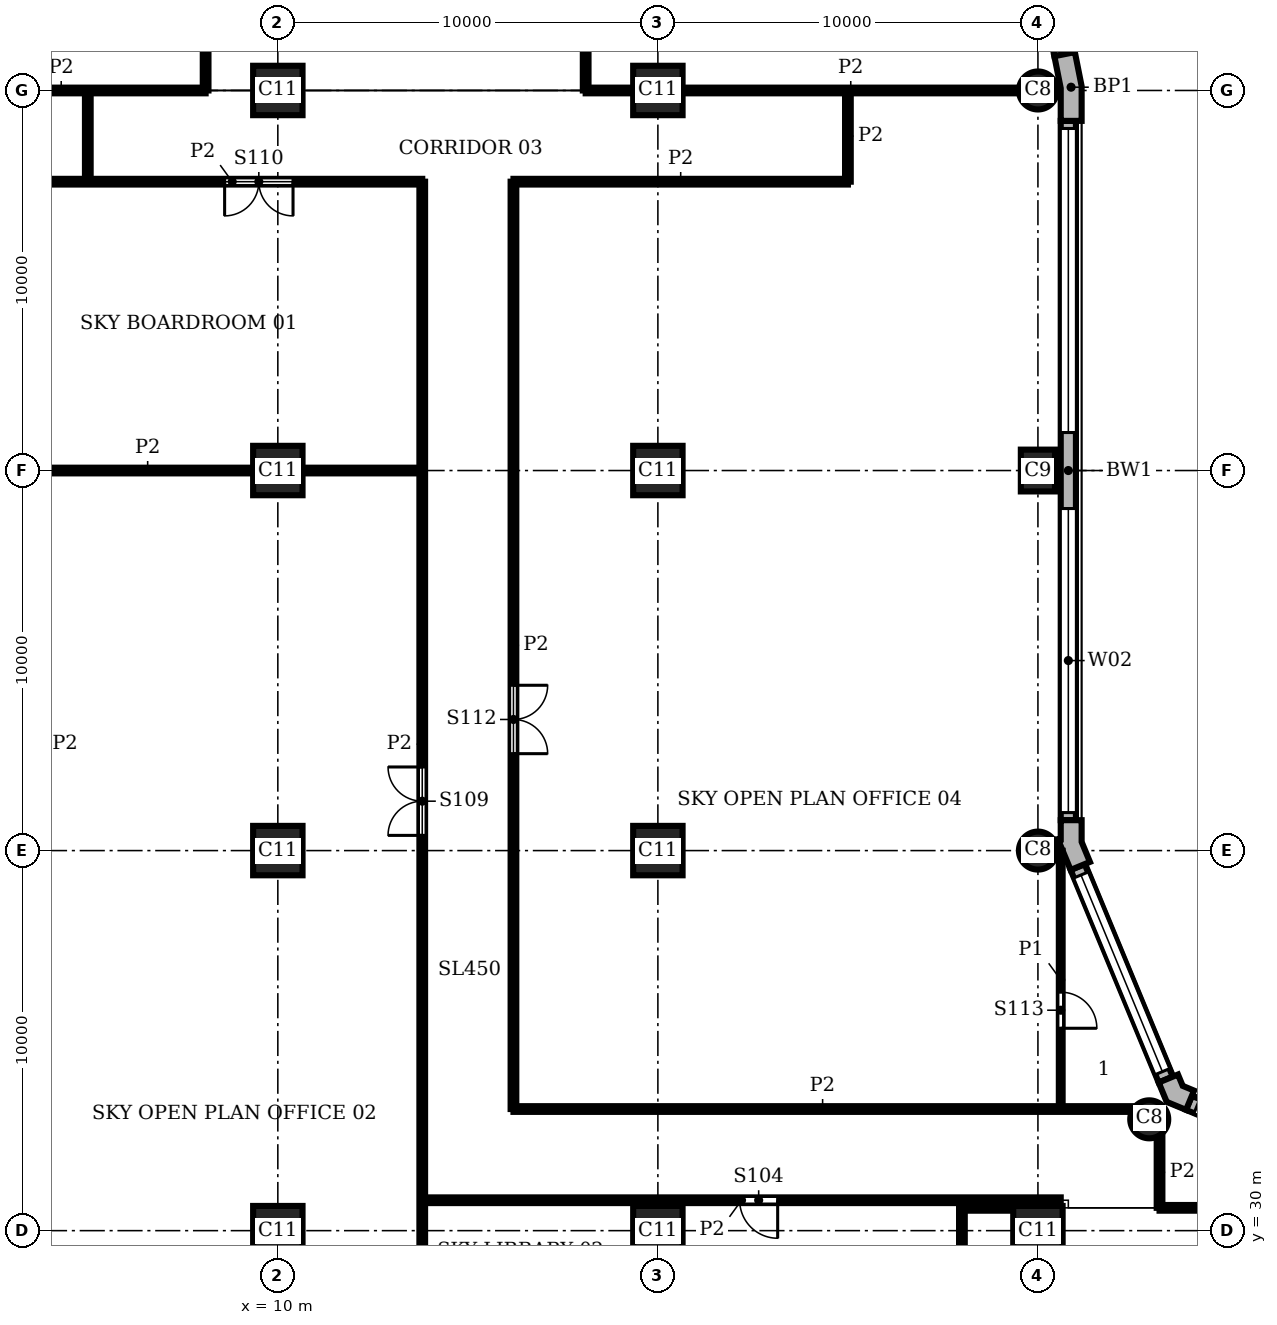
"""IFC4 building model, lengths in metres.
Left out: names, types, materials, properties, quantities, classifications, styles, units other than length and angle.
Written with IfcOpenShell. Run it as: python <this file> out.ifc"""

import sys

from ifc_helpers import new_model, si_unit, direction, frame, frame_2d, origin, origin_2d, place, context, subcontext, project, spatial, polyline, rectangle, circle, outline, extrude, element, fill, save


model = new_model("IFC4")
c1 = context("Model", 3, precision=1e-05, world=origin(), true_north=direction((0.0, 1.0)))
c2 = subcontext(c1, "Body", "Model", "MODEL_VIEW")
j1 = project(units=[si_unit("LENGTHUNIT", "METRE"), si_unit("PLANEANGLEUNIT", "RADIAN")], contexts=[c1])
p1 = place(None, origin())
s1 = spatial("IfcSite", under=j1, at=p1, CompositionType="ELEMENT")
p2 = place(p1, origin())
s2 = spatial("IfcBuilding", under=s1, at=p2, CompositionType="ELEMENT")
p3 = place(p2, frame((0.0, 0.0, 126.3)))
s3 = spatial("IfcBuildingStorey", under=s2, at=p3, CompositionType="ELEMENT", Elevation=126.3)
for number, where, z_axis, x_axis in (
    (1, (32.929, 32.929, 0.0), (0.0, 0.0, 1.0), (1.0, 0.0, 0.0)),
    (2, (30.0, 40.0, 0.0), (0.0, 0.0, 1.0), (1.0, 0.0, 0.0)),
):
    element("IfcColumn", number, at=place(p3, frame(where, z_axis=z_axis, x_axis=x_axis)), inside=s3, PredefinedType="COLUMN", context=c2, shape_type="SweptSolid", body=[
        extrude(circle(Radius=0.5, at=origin_2d()), origin(), (0.0, 0.0, 1.0), 5.4),
    ])
p4 = place(p3, frame((30.0, 50.0, 0.0), z_axis=(0.0, 0.0, 1.0), x_axis=(0.0, 1.0, 0.0)))
e3 = element("IfcColumn", 3, at=p4, inside=s3, PredefinedType="COLUMN", context=c2, shape_type="SweptSolid", body=[
    extrude(rectangle(XDim=1.1, YDim=0.9, at=origin_2d()), origin(), (0.0, 0.0, 1.0), 5.4),
])
p5 = place(p3, frame((30.0, 60.0, 0.0), z_axis=(0.0, 0.0, 1.0), x_axis=(1.0, 0.0, 0.0)))
e4 = element("IfcColumn", 4, at=p5, inside=s3, PredefinedType="COLUMN", context=c2, shape_type="SweptSolid", body=[
    extrude(circle(Radius=0.5, at=origin_2d()), origin(), (0.0, 0.0, 1.0), 5.4),
])
for number, where, z_axis, x_axis in (
    (5, (10.0, 30.0, 0.0), (0.0, 0.0, 1.0), (1.0, 0.0, 0.0)),
    (6, (10.0, 40.0, 0.0), (0.0, 0.0, 1.0), (1.0, 0.0, 0.0)),
    (7, (10.0, 50.0, 0.0), (0.0, 0.0, 1.0), (1.0, 0.0, 0.0)),
    (8, (10.0, 60.0, 0.0), (0.0, 0.0, 1.0), (1.0, 0.0, 0.0)),
    (9, (20.0, 30.0, 0.0), (0.0, 0.0, 1.0), (1.0, 0.0, 0.0)),
    (10, (20.0, 40.0, 0.0), (0.0, 0.0, 1.0), (1.0, 0.0, 0.0)),
    (11, (20.0, 50.0, 0.0), (0.0, 0.0, 1.0), (1.0, 0.0, 0.0)),
    (12, (20.0, 60.0, 0.0), (0.0, 0.0, 1.0), (1.0, 0.0, 0.0)),
    (13, (30.0, 30.0, 0.0), (0.0, 0.0, 1.0), (1.0, 0.0, 0.0)),
):
    element("IfcColumn", number, at=place(p3, frame(where, z_axis=z_axis, x_axis=x_axis)), inside=s3, PredefinedType="COLUMN", context=c2, shape_type="SweptSolid", body=[
        extrude(rectangle(XDim=1.3, YDim=1.3, at=origin_2d()), origin(), (0.0, 0.0, 1.0), 5.4),
    ])
p6 = place(p3, origin())
e14 = element("IfcWall", 14, at=p6, inside=s3, PredefinedType="SOLIDWALL", context=c2, shape_type="SweptSolid", body=[
    extrude(outline(polyline([(34.051, 33.547), (34.108, 33.685), (33.809, 33.809), (33.685, 34.108), (33.547, 34.051), (33.177, 33.898), (33.388, 33.388), (33.898, 33.177), (34.051, 33.547)])), origin(), (0.0, 0.0, 1.0), 5.4),
])
e15 = element("IfcWall", 15, at=p6, inside=s3, PredefinedType="SOLIDWALL", context=c2, shape_type="SweptSolid", body=[
    extrude(outline(polyline([(30.62, 39.995), (30.62, 40.071), (30.861, 39.49), (31.23, 39.644), (31.369, 39.701), (31.15, 40.229), (31.15, 40.8), (31.0, 40.8), (30.6, 40.8), (30.6, 40.295), (30.5, 40.295), (30.5, 39.995), (30.62, 39.995)])), origin(), (0.0, 0.0, 1.0), 5.4),
])
e16 = element("IfcWall", 16, at=p6, inside=s3, PredefinedType="SOLIDWALL", context=c2, shape_type="SweptSolid", body=[
    extrude(outline(polyline([(31.0, 59.2), (31.15, 59.2), (31.15, 60.113), (30.972, 61.009), (30.825, 60.98), (30.432, 60.902), (30.6, 60.059), (30.6, 59.2), (31.0, 59.2)])), origin(), (0.0, 0.0, 1.0), 5.4),
])
p7 = place(p3, frame((39.567, 31.045, 0.0), z_axis=(0.0, 0.0, 1.0), x_axis=(-0.923891000409, 0.382655745237, 0.0)))
e17 = element("IfcWall", 17, at=p7, inside=s3, PredefinedType="SOLIDWALL", context=c2, shape_type="SweptSolid", body=[
    extrude(rectangle(XDim=6.053, YDim=0.4, at=frame_2d((3.027, 0.0))), origin(), (0.0, 0.0, 1.0), 5.4),
])
p8 = place(p7, frame((0.227, 0.0, 0.9)))
e18 = element("IfcOpeningElement", 18, at=p8, cuts=e17, PredefinedType="OPENING", context=c2, shape_type="SweptSolid", body=[
    extrude(rectangle(XDim=5.6, YDim=3.4, at=frame_2d((2.8, 1.7))), frame((0.0, 0.21, 0.0), z_axis=(0.0, -1.0, 0.0), x_axis=(1.0, 0.0, 0.0)), (0.0, 0.0, 1.0), 0.42),
])
p9 = place(p3, frame((33.362, 33.974, 0.0), z_axis=(0.0, 0.0, 1.0), x_axis=(-0.382655745237, 0.923891000409, 0.0)))
e19 = element("IfcWall", 19, at=p9, inside=s3, PredefinedType="SOLIDWALL", context=c2, shape_type="SweptSolid", body=[
    extrude(rectangle(XDim=6.053, YDim=0.4, at=frame_2d((3.027, 0.0))), origin(), (0.0, 0.0, 1.0), 5.4),
])
p10 = place(p9, frame((0.227, 0.0, 0.9)))
e20 = element("IfcOpeningElement", 20, at=p10, cuts=e19, PredefinedType="OPENING", context=c2, shape_type="SweptSolid", body=[
    extrude(rectangle(XDim=5.6, YDim=3.4, at=frame_2d((2.8, 1.7))), frame((0.0, 0.21, 0.0), z_axis=(0.0, -1.0, 0.0), x_axis=(1.0, 0.0, 0.0)), (0.0, 0.0, 1.0), 0.42),
])
p11 = place(p3, frame((30.8, 40.8, 0.0), z_axis=(0.0, 0.0, 1.0), x_axis=(0.0, 1.0, 0.0)))
e21 = element("IfcWall", 21, at=p11, inside=s3, PredefinedType="SOLIDWALL", context=c2, shape_type="SweptSolid", body=[
    extrude(rectangle(XDim=18.4, YDim=0.4, at=frame_2d((9.2, 0.0))), origin(), (0.0, 0.0, 1.0), 5.4),
])
p12 = place(p11, frame((0.2, 0.0, 0.9)))
e22 = element("IfcOpeningElement", 22, at=p12, cuts=e21, PredefinedType="OPENING", context=c2, shape_type="SweptSolid", body=[
    extrude(rectangle(XDim=8.0, YDim=3.4, at=frame_2d((4.0, 1.7))), frame((0.0, 0.21, 0.0), z_axis=(0.0, -1.0, 0.0), x_axis=(1.0, 0.0, 0.0)), (0.0, 0.0, 1.0), 0.42),
])
p13 = place(p11, frame((10.2, 0.0, 0.9)))
e23 = element("IfcOpeningElement", 23, at=p13, cuts=e21, PredefinedType="OPENING", context=c2, shape_type="SweptSolid", body=[
    extrude(rectangle(XDim=8.0, YDim=3.4, at=frame_2d((4.0, 1.7))), frame((0.0, 0.21, 0.0), z_axis=(0.0, -1.0, 0.0), x_axis=(1.0, 0.0, 0.0)), (0.0, 0.0, 1.0), 0.42),
])
p14 = place(p3, frame((30.629, 60.941, 0.0), z_axis=(0.0, 0.0, 1.0), x_axis=(-0.195098533057, 0.98078364709, 0.0)))
e24 = element("IfcWall", 24, at=p14, inside=s3, PredefinedType="SOLIDWALL", context=c2, shape_type="SweptSolid", body=[
    extrude(rectangle(XDim=4.753, YDim=0.4, at=frame_2d((2.376, 0.0))), origin(), (0.0, 0.0, 1.0), 5.4),
])
p15 = place(p14, frame((0.226, 0.0, 0.9)))
e25 = element("IfcOpeningElement", 25, at=p15, cuts=e24, PredefinedType="OPENING", context=c2, shape_type="SweptSolid", body=[
    extrude(rectangle(XDim=4.3, YDim=3.4, at=frame_2d((2.15, 1.7))), frame((0.0, 0.21, 0.0), z_axis=(0.0, -1.0, 0.0), x_axis=(1.0, 0.0, 0.0)), (0.0, 0.0, 1.0), 0.42),
])
p16 = place(p3, frame((30.6, 33.2, 0.0), z_axis=(0.0, 0.0, 1.0), x_axis=(0.0, 1.0, 0.0)))
e26 = element("IfcWall", 26, at=p16, inside=s3, PredefinedType="PARTITIONING", context=c2, shape_type="SweptSolid", body=[
    extrude(rectangle(XDim=6.795, YDim=0.1, at=frame_2d((3.397, 0.0))), origin(), (0.0, 0.0, 1.0), 5.08),
])
p17 = place(p16, frame((2.125, 0.0, 0.0)))
e27 = element("IfcOpeningElement", 27, at=p17, cuts=e26, PredefinedType="OPENING", context=c2, shape_type="SweptSolid", body=[
    extrude(rectangle(XDim=0.95, YDim=2.1, at=frame_2d((0.475, 1.05))), frame((0.0, 0.06, 0.0), z_axis=(0.0, -1.0, 0.0), x_axis=(1.0, 0.0, 0.0)), (0.0, 0.0, 1.0), 0.12),
])
p18 = place(p3, frame((5.0, 57.6, 0.0), z_axis=(0.0, 0.0, 1.0), x_axis=(0.0, 1.0, 0.0)))
e28 = element("IfcWall", 28, at=p18, inside=s3, PredefinedType="PARTITIONING", context=c2, shape_type="SweptSolid", body=[
    extrude(rectangle(XDim=2.4, YDim=0.15, at=frame_2d((1.2, 0.0))), origin(), (0.0, 0.0, 1.0), 5.08),
])
p19 = place(p3, frame((8.1, 60.0, 0.0), z_axis=(0.0, 0.0, 1.0), x_axis=(0.0, 1.0, 0.0)))
e29 = element("IfcWall", 29, at=p19, inside=s3, PredefinedType="PARTITIONING", context=c2, shape_type="SweptSolid", body=[
    extrude(rectangle(XDim=6.4, YDim=0.15, at=frame_2d((3.2, 0.0))), origin(), (0.0, 0.0, 1.0), 5.08),
])
p20 = place(p19, frame((2.6, 0.0, 0.0)))
e30 = element("IfcOpeningElement", 30, at=p20, cuts=e29, PredefinedType="OPENING", context=c2, shape_type="SweptSolid", body=[
    extrude(rectangle(XDim=1.8, YDim=2.1, at=frame_2d((0.9, 1.05))), frame((0.0, 0.085, 0.0), z_axis=(0.0, -1.0, 0.0), x_axis=(1.0, 0.0, 0.0)), (0.0, 0.0, 1.0), 0.17),
])
p21 = place(p3, frame((13.8, 28.0, 0.0), z_axis=(0.0, 0.0, 1.0), x_axis=(0.0, 1.0, 0.0)))
e31 = element("IfcWall", 31, at=p21, inside=s3, PredefinedType="PARTITIONING", context=c2, shape_type="SweptSolid", body=[
    extrude(rectangle(XDim=29.6, YDim=0.15, at=frame_2d((14.8, 0.0))), origin(), (0.0, 0.0, 1.0), 5.08),
])
p22 = place(p21, frame((12.4, 0.0, 0.0)))
e32 = element("IfcOpeningElement", 32, at=p22, cuts=e31, PredefinedType="OPENING", context=c2, shape_type="SweptSolid", body=[
    extrude(rectangle(XDim=1.8, YDim=2.1, at=frame_2d((0.9, 1.05))), frame((0.0, 0.085, 0.0), z_axis=(0.0, -1.0, 0.0), x_axis=(1.0, 0.0, 0.0)), (0.0, 0.0, 1.0), 0.17),
])
p23 = place(p3, frame((16.2, 33.2, 0.0), z_axis=(0.0, 0.0, 1.0), x_axis=(0.0, 1.0, 0.0)))
e33 = element("IfcWall", 33, at=p23, inside=s3, PredefinedType="PARTITIONING", context=c2, shape_type="SweptSolid", body=[
    extrude(rectangle(XDim=24.4, YDim=0.15, at=frame_2d((12.2, 0.0))), origin(), (0.0, 0.0, 1.0), 5.08),
])
p24 = place(p23, frame((9.35, 0.0, 0.0)))
e34 = element("IfcOpeningElement", 34, at=p24, cuts=e33, PredefinedType="OPENING", context=c2, shape_type="SweptSolid", body=[
    extrude(rectangle(XDim=1.8, YDim=2.1, at=frame_2d((0.9, 1.05))), frame((0.0, 0.085, 0.0), z_axis=(0.0, -1.0, 0.0), x_axis=(1.0, 0.0, 0.0)), (0.0, 0.0, 1.0), 0.17),
])
p25 = place(p3, frame((18.1, 60.0, 0.0), z_axis=(0.0, 0.0, 1.0), x_axis=(0.0, 1.0, 0.0)))
e35 = element("IfcWall", 35, at=p25, inside=s3, PredefinedType="PARTITIONING", context=c2, shape_type="SweptSolid", body=[
    extrude(rectangle(XDim=6.4, YDim=0.15, at=frame_2d((3.2, 0.0))), origin(), (0.0, 0.0, 1.0), 5.08),
])
p26 = place(p3, frame((25.0, 57.6, 0.0), z_axis=(0.0, 0.0, 1.0), x_axis=(0.0, 1.0, 0.0)))
e36 = element("IfcWall", 36, at=p26, inside=s3, PredefinedType="PARTITIONING", context=c2, shape_type="SweptSolid", body=[
    extrude(rectangle(XDim=2.4, YDim=0.15, at=frame_2d((1.2, 0.0))), origin(), (0.0, 0.0, 1.0), 5.08),
])
p27 = place(p3, frame((28.0, 28.0, 0.0), z_axis=(0.0, 0.0, 1.0), x_axis=(0.0, 1.0, 0.0)))
e37 = element("IfcWall", 37, at=p27, inside=s3, PredefinedType="PARTITIONING", context=c2, shape_type="SweptSolid", body=[
    extrude(rectangle(XDim=2.598, YDim=0.15, at=frame_2d((1.299, 0.0))), origin(), (0.0, 0.0, 1.0), 5.08),
])
p28 = place(p3, frame((33.2, 30.6, 0.0), z_axis=(0.0, 0.0, 1.0), x_axis=(0.0, 1.0, 0.0)))
e38 = element("IfcWall", 38, at=p28, inside=s3, PredefinedType="PARTITIONING", context=c2, shape_type="SweptSolid", body=[
    extrude(rectangle(XDim=1.869, YDim=0.15, at=frame_2d((0.935, 0.0))), origin(), (0.0, 0.0, 1.0), 5.08),
])
p29 = place(p3, frame((28.002, 30.6, 0.0), z_axis=(0.0, 0.0, 1.0), x_axis=(1.0, 0.0, 0.0)))
e39 = element("IfcWall", 39, at=p29, inside=s3, PredefinedType="PARTITIONING", context=c2, shape_type="SweptSolid", body=[
    extrude(rectangle(XDim=1.348, YDim=0.15, at=frame_2d((0.674, 0.0))), origin(), (0.0, 0.0, 1.0), 5.08),
])
p30 = place(p3, frame((33.2, 30.6, 0.0), z_axis=(0.0, 0.0, 1.0), x_axis=(1.0, 0.0, 0.0)))
e40 = element("IfcWall", 40, at=p30, inside=s3, PredefinedType="PARTITIONING", context=c2, shape_type="SweptSolid", body=[
    extrude(rectangle(XDim=6.738, YDim=0.15, at=frame_2d((3.369, 0.0))), origin(), (0.0, 0.0, 1.0), 5.08),
])
p31 = place(p3, frame((13.802, 30.8, 0.0), z_axis=(0.0, 0.0, 1.0), x_axis=(1.0, 0.0, 0.0)))
e41 = element("IfcWall", 41, at=p31, inside=s3, PredefinedType="PARTITIONING", context=c2, shape_type="SweptSolid", body=[
    extrude(rectangle(XDim=16.798, YDim=0.15, at=frame_2d((8.399, 0.0))), origin(), (0.0, 0.0, 1.0), 5.08),
])
p32 = place(p31, frame((8.35, 0.0, 0.0)))
e42 = element("IfcOpeningElement", 42, at=p32, cuts=e41, PredefinedType="OPENING", context=c2, shape_type="SweptSolid", body=[
    extrude(rectangle(XDim=1.0, YDim=2.1, at=frame_2d((0.5, 1.05))), frame((0.0, 0.085, 0.0), z_axis=(0.0, -1.0, 0.0), x_axis=(1.0, 0.0, 0.0)), (0.0, 0.0, 1.0), 0.17),
])
p33 = place(p3, frame((16.2, 33.2, 0.0), z_axis=(0.0, 0.0, 1.0), x_axis=(1.0, 0.0, 0.0)))
e43 = element("IfcWall", 43, at=p33, inside=s3, PredefinedType="PARTITIONING", context=c2, shape_type="SweptSolid", body=[
    extrude(rectangle(XDim=16.269, YDim=0.15, at=frame_2d((8.135, 0.0))), origin(), (0.0, 0.0, 1.0), 5.08),
])
p34 = place(p3, frame((3.8, 50.0, 0.0), z_axis=(0.0, 0.0, 1.0), x_axis=(1.0, 0.0, 0.0)))
e44 = element("IfcWall", 44, at=p34, inside=s3, PredefinedType="PARTITIONING", context=c2, shape_type="SweptSolid", body=[
    extrude(rectangle(XDim=5.55, YDim=0.15, at=frame_2d((2.775, 0.0))), origin(), (0.0, 0.0, 1.0), 5.08),
])
p35 = place(p3, frame((10.65, 50.0, 0.0), z_axis=(0.0, 0.0, 1.0), x_axis=(1.0, 0.0, 0.0)))
e45 = element("IfcWall", 45, at=p35, inside=s3, PredefinedType="PARTITIONING", context=c2, shape_type="SweptSolid", body=[
    extrude(rectangle(XDim=3.15, YDim=0.15, at=frame_2d((1.575, 0.0))), origin(), (0.0, 0.0, 1.0), 5.08),
])
p36 = place(p3, frame((3.8, 57.6, 0.0), z_axis=(0.0, 0.0, 1.0), x_axis=(1.0, 0.0, 0.0)))
e46 = element("IfcWall", 46, at=p36, inside=s3, PredefinedType="PARTITIONING", context=c2, shape_type="SweptSolid", body=[
    extrude(rectangle(XDim=10.0, YDim=0.15, at=frame_2d((5.0, 0.0))), origin(), (0.0, 0.0, 1.0), 5.08),
])
p37 = place(p36, frame((4.8, 0.0, 0.0)))
e47 = element("IfcOpeningElement", 47, at=p37, cuts=e46, PredefinedType="OPENING", context=c2, shape_type="SweptSolid", body=[
    extrude(rectangle(XDim=1.8, YDim=2.1, at=frame_2d((0.9, 1.05))), frame((0.0, 0.085, 0.0), z_axis=(0.0, -1.0, 0.0), x_axis=(1.0, 0.0, 0.0)), (0.0, 0.0, 1.0), 0.17),
])
p38 = place(p3, frame((16.2, 57.6, 0.0), z_axis=(0.0, 0.0, 1.0), x_axis=(1.0, 0.0, 0.0)))
e48 = element("IfcWall", 48, at=p38, inside=s3, PredefinedType="PARTITIONING", context=c2, shape_type="SweptSolid", body=[
    extrude(rectangle(XDim=8.8, YDim=0.15, at=frame_2d((4.4, 0.0))), origin(), (0.0, 0.0, 1.0), 5.08),
])
p39 = place(p3, frame((0.5, 60.0, 0.0), z_axis=(0.0, 0.0, 1.0), x_axis=(1.0, 0.0, 0.0)))
e49 = element("IfcWall", 49, at=p39, inside=s3, PredefinedType="PARTITIONING", context=c2, shape_type="SweptSolid", body=[
    extrude(rectangle(XDim=7.6, YDim=0.15, at=frame_2d((3.8, 0.0))), origin(), (0.0, 0.0, 1.0), 5.08),
])
p40 = place(p3, frame((18.1, 60.0, 0.0), z_axis=(0.0, 0.0, 1.0), x_axis=(1.0, 0.0, 0.0)))
e50 = element("IfcWall", 50, at=p40, inside=s3, PredefinedType="PARTITIONING", context=c2, shape_type="SweptSolid", body=[
    extrude(rectangle(XDim=1.25, YDim=0.15, at=frame_2d((0.625, 0.0))), origin(), (0.0, 0.0, 1.0), 5.08),
])
p41 = place(p3, frame((20.65, 60.0, 0.0), z_axis=(0.0, 0.0, 1.0), x_axis=(1.0, 0.0, 0.0)))
e51 = element("IfcWall", 51, at=p41, inside=s3, PredefinedType="PARTITIONING", context=c2, shape_type="SweptSolid", body=[
    extrude(rectangle(XDim=8.85, YDim=0.15, at=frame_2d((4.425, 0.0))), origin(), (0.0, 0.0, 1.0), 5.08),
])
p42 = place(p8, origin())
e52 = element("IfcWindow", 52, at=p42, inside=s3, PartitioningType="SINGLE_PANEL", PredefinedType="WINDOW", context=c2, shape_type="SweptSolid", body=[
    extrude(rectangle(XDim=5.6, YDim=3.4, at=frame_2d((2.8, 1.7))), frame((0.0, 0.16, 0.0), z_axis=(0.0, -1.0, 0.0), x_axis=(1.0, 0.0, 0.0)), (0.0, 0.0, 1.0), 0.06),
])
fill(e18, e52)
p43 = place(p10, origin())
e53 = element("IfcWindow", 53, at=p43, inside=s3, PartitioningType="SINGLE_PANEL", PredefinedType="WINDOW", context=c2, shape_type="SweptSolid", body=[
    extrude(rectangle(XDim=5.6, YDim=3.4, at=frame_2d((2.8, 1.7))), frame((0.0, 0.16, 0.0), z_axis=(0.0, -1.0, 0.0), x_axis=(1.0, 0.0, 0.0)), (0.0, 0.0, 1.0), 0.06),
])
fill(e20, e53)
p44 = place(p12, origin())
e54 = element("IfcWindow", 54, at=p44, inside=s3, PartitioningType="SINGLE_PANEL", PredefinedType="WINDOW", context=c2, shape_type="SweptSolid", body=[
    extrude(rectangle(XDim=8.0, YDim=3.4, at=frame_2d((4.0, 1.7))), frame((0.0, 0.16, 0.0), z_axis=(0.0, -1.0, 0.0), x_axis=(1.0, 0.0, 0.0)), (0.0, 0.0, 1.0), 0.06),
])
fill(e22, e54)
p45 = place(p13, origin())
e55 = element("IfcWindow", 55, at=p45, inside=s3, PartitioningType="SINGLE_PANEL", PredefinedType="WINDOW", context=c2, shape_type="SweptSolid", body=[
    extrude(rectangle(XDim=8.0, YDim=3.4, at=frame_2d((4.0, 1.7))), frame((0.0, 0.16, 0.0), z_axis=(0.0, -1.0, 0.0), x_axis=(1.0, 0.0, 0.0)), (0.0, 0.0, 1.0), 0.06),
])
fill(e23, e55)
p46 = place(p32, frame((1.0, 0.0, 0.0), z_axis=(0.0, 0.0, 1.0), x_axis=(-1.0, 0.0, 0.0)))
e56 = element("IfcDoor", 56, at=p46, inside=s3, OperationType="SINGLE_SWING_LEFT", PredefinedType="DOOR", context=c2, shape_type="SweptSolid", body=[
    extrude(rectangle(XDim=1.0, YDim=2.1, at=frame_2d((0.5, 1.05))), frame((0.0, 0.025, 0.0), z_axis=(0.0, -1.0, 0.0), x_axis=(1.0, 0.0, 0.0)), (0.0, 0.0, 1.0), 0.05),
])
fill(e42, e56)
p47 = place(p22, origin())
e57 = element("IfcDoor", 57, at=p47, inside=s3, OperationType="DOUBLE_DOOR_SINGLE_SWING", PredefinedType="DOOR", context=c2, shape_type="SweptSolid", body=[
    extrude(rectangle(XDim=1.8, YDim=2.1, at=frame_2d((0.9, 1.05))), frame((0.0, 0.025, 0.0), z_axis=(0.0, -1.0, 0.0), x_axis=(1.0, 0.0, 0.0)), (0.0, 0.0, 1.0), 0.05),
])
fill(e32, e57)
p48 = place(p37, frame((1.8, 0.0, 0.0), z_axis=(0.0, 0.0, 1.0), x_axis=(-1.0, 0.0, 0.0)))
e58 = element("IfcDoor", 58, at=p48, inside=s3, OperationType="DOUBLE_DOOR_SINGLE_SWING", PredefinedType="DOOR", context=c2, shape_type="SweptSolid", body=[
    extrude(rectangle(XDim=1.8, YDim=2.1, at=frame_2d((0.9, 1.05))), frame((0.0, 0.025, 0.0), z_axis=(0.0, -1.0, 0.0), x_axis=(1.0, 0.0, 0.0)), (0.0, 0.0, 1.0), 0.05),
])
fill(e47, e58)
p49 = place(p24, frame((1.8, 0.0, 0.0), z_axis=(0.0, 0.0, 1.0), x_axis=(-1.0, 0.0, 0.0)))
e59 = element("IfcDoor", 59, at=p49, inside=s3, OperationType="DOUBLE_DOOR_SINGLE_SWING", PredefinedType="DOOR", context=c2, shape_type="SweptSolid", body=[
    extrude(rectangle(XDim=1.8, YDim=2.1, at=frame_2d((0.9, 1.05))), frame((0.0, 0.025, 0.0), z_axis=(0.0, -1.0, 0.0), x_axis=(1.0, 0.0, 0.0)), (0.0, 0.0, 1.0), 0.05),
])
fill(e34, e59)
p50 = place(p17, frame((0.95, 0.0, 0.0), z_axis=(0.0, 0.0, 1.0), x_axis=(-1.0, 0.0, 0.0)))
e60 = element("IfcDoor", 60, at=p50, inside=s3, OperationType="SINGLE_SWING_RIGHT", PredefinedType="DOOR", context=c2, shape_type="SweptSolid", body=[
    extrude(rectangle(XDim=0.95, YDim=2.1, at=frame_2d((0.475, 1.05))), frame((0.0, 0.025, 0.0), z_axis=(0.0, -1.0, 0.0), x_axis=(1.0, 0.0, 0.0)), (0.0, 0.0, 1.0), 0.05),
])
fill(e27, e60)
save(model, sys.argv[1])
